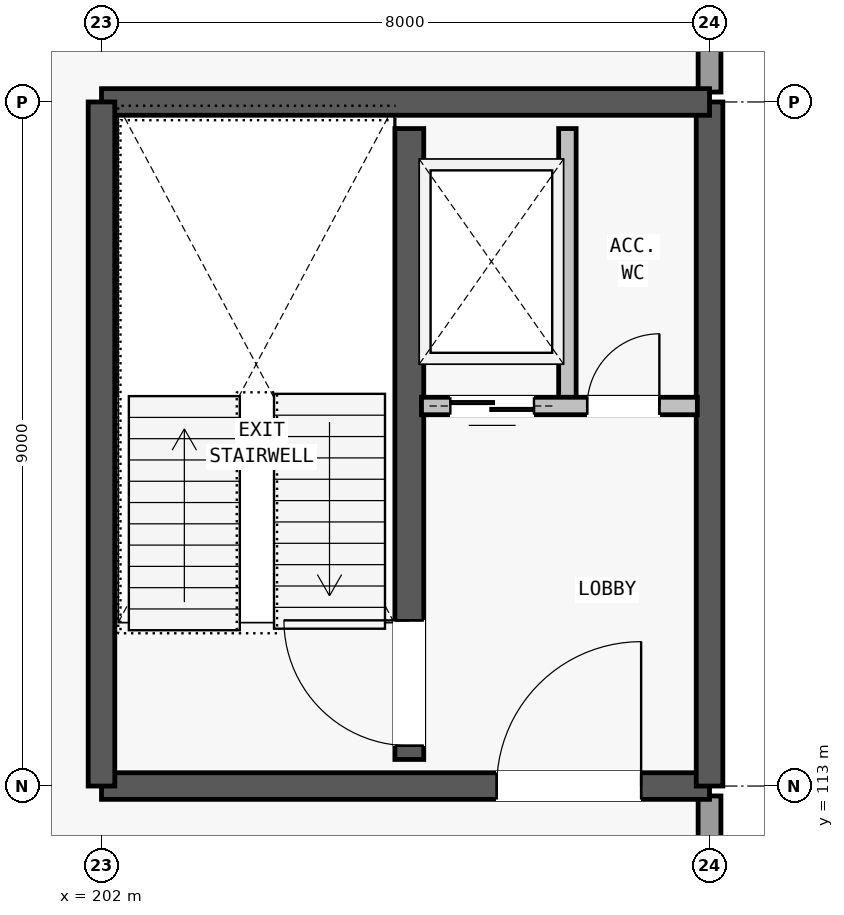
"""IFC4 building model, lengths in metres.
Left out: names, types, materials, properties, quantities, classifications, styles, units other than length and angle.
Written with IfcOpenShell. Run it as: python <this file> out.ifc"""

import sys

from ifc_helpers import new_model, si_unit, direction, frame, frame_2d, origin, place, context, subcontext, project, spatial, rectangle, extrude, element, fill, save


model = new_model("IFC4")
c1 = context("Model", 3, precision=1e-05, world=origin(), true_north=direction((0.0, 1.0)))
c2 = subcontext(c1, "Body", "Model", "MODEL_VIEW")
j1 = project(units=[si_unit("LENGTHUNIT", "METRE"), si_unit("PLANEANGLEUNIT", "RADIAN")], contexts=[c1])
p1 = place(None, origin())
s1 = spatial("IfcSite", under=j1, at=p1, CompositionType="ELEMENT")
p2 = place(p1, origin())
s2 = spatial("IfcBuilding", under=s1, at=p2, CompositionType="ELEMENT")
p3 = place(p2, frame((0.0, 0.0, 17.3)))
s3 = spatial("IfcBuildingStorey", under=s2, at=p3, CompositionType="ELEMENT", Elevation=17.3)
for number, where, z_axis, x_axis in (
    (1, (210.0, 104.235, 0.0), (0.0, 0.0, 1.0), (0.0, 1.0, 0.0)),
    (2, (210.0, 122.13, 0.0), (0.0, 0.0, 1.0), (0.0, 1.0, 0.0)),
):
    element("IfcWall", number, at=place(p3, frame(where, z_axis=z_axis, x_axis=x_axis)), inside=s3, PredefinedType="STANDARD", context=c2, shape_type="SweptSolid", body=[
        extrude(rectangle(XDim=8.635, YDim=0.3, at=frame_2d((4.317, 0.0))), origin(), (0.0, 0.0, 1.0), 2.48),
    ])
p4 = place(p3, frame((202.0, 113.0, 0.0), z_axis=(0.0, 0.0, 1.0), x_axis=(1.0, 0.0, 0.0)))
e3 = element("IfcWall", 3, at=p4, inside=s3, PredefinedType="SHEAR", context=c2, shape_type="SweptSolid", body=[
    extrude(rectangle(XDim=8.0, YDim=0.35, at=frame_2d((4.0, 0.0))), origin(), (0.0, 0.0, 1.0), 3.62),
])
p5 = place(p4, frame((5.2, 0.0, 0.0)))
e4 = element("IfcOpeningElement", 4, at=p5, cuts=e3, PredefinedType="OPENING", context=c2, shape_type="SweptSolid", body=[
    extrude(rectangle(XDim=1.9, YDim=2.3, at=frame_2d((0.95, 1.15))), frame((0.0, 0.185, 0.0), z_axis=(0.0, -1.0, 0.0), x_axis=(1.0, 0.0, 0.0)), (0.0, 0.0, 1.0), 0.37),
])
p6 = place(p3, frame((210.0, 113.0, 0.0), z_axis=(0.0, 0.0, 1.0), x_axis=(0.0, 1.0, 0.0)))
e5 = element("IfcWall", 5, at=p6, inside=s3, PredefinedType="SHEAR", context=c2, shape_type="SweptSolid", body=[
    extrude(rectangle(XDim=9.0, YDim=0.35, at=frame_2d((4.5, 0.0))), origin(), (0.0, 0.0, 1.0), 3.62),
])
p7 = place(p3, frame((210.0, 122.0, 0.0), z_axis=(0.0, 0.0, 1.0), x_axis=(-1.0, 0.0, 0.0)))
e6 = element("IfcWall", 6, at=p7, inside=s3, PredefinedType="SHEAR", context=c2, shape_type="SweptSolid", body=[
    extrude(rectangle(XDim=8.0, YDim=0.35, at=frame_2d((4.0, 0.0))), origin(), (0.0, 0.0, 1.0), 3.62),
])
p8 = place(p3, frame((202.0, 122.0, 0.0), z_axis=(0.0, 0.0, 1.0), x_axis=(0.0, -1.0, 0.0)))
e7 = element("IfcWall", 7, at=p8, inside=s3, PredefinedType="SHEAR", context=c2, shape_type="SweptSolid", body=[
    extrude(rectangle(XDim=9.0, YDim=0.35, at=frame_2d((4.5, 0.0))), origin(), (0.0, 0.0, 1.0), 3.62),
])
p9 = place(p3, frame((206.05, 113.35, 0.0), z_axis=(0.0, 0.0, 1.0), x_axis=(0.0, 1.0, 0.0)))
e8 = element("IfcWall", 8, at=p9, inside=s3, PredefinedType="SHEAR", context=c2, shape_type="SweptSolid", body=[
    extrude(rectangle(XDim=8.3, YDim=0.38, at=frame_2d((4.15, 0.0))), origin(), (0.0, 0.0, 1.0), 3.62),
])
p10 = place(p9, frame((0.18, 0.0, 0.0)))
e9 = element("IfcOpeningElement", 9, at=p10, cuts=e8, PredefinedType="OPENING", context=c2, shape_type="SweptSolid", body=[
    extrude(rectangle(XDim=1.65, YDim=2.2, at=frame_2d((0.825, 1.1))), frame((0.0, 0.2, 0.0), z_axis=(0.0, -1.0, 0.0), x_axis=(1.0, 0.0, 0.0)), (0.0, 0.0, 1.0), 0.4),
])
p11 = place(p3, frame((208.13, 118.0, 0.0), z_axis=(0.0, 0.0, 1.0), x_axis=(0.0, 1.0, 0.0)))
e10 = element("IfcWall", 10, at=p11, inside=s3, PredefinedType="PARTITIONING", context=c2, shape_type="SweptSolid", body=[
    extrude(rectangle(XDim=3.65, YDim=0.23, at=frame_2d((1.825, 0.0))), origin(), (0.0, 0.0, 1.0), 2.48),
])
p12 = place(p3, frame((206.21, 118.0, 0.0), z_axis=(0.0, 0.0, 1.0), x_axis=(1.0, 0.0, 0.0)))
e11 = element("IfcWall", 11, at=p12, inside=s3, PredefinedType="PARTITIONING", context=c2, shape_type="SweptSolid", body=[
    extrude(rectangle(XDim=3.63, YDim=0.23, at=frame_2d((1.815, 0.0))), origin(), (0.0, 0.0, 1.0), 2.48),
])
p13 = place(p12, frame((0.38, 0.0, 0.0)))
e12 = element("IfcOpeningElement", 12, at=p13, cuts=e11, PredefinedType="OPENING", context=c2, shape_type="SweptSolid", body=[
    extrude(rectangle(XDim=1.1, YDim=2.15, at=frame_2d((0.55, 1.075))), frame((0.0, 0.125, 0.0), z_axis=(0.0, -1.0, 0.0), x_axis=(1.0, 0.0, 0.0)), (0.0, 0.0, 1.0), 0.25),
])
p14 = place(p12, frame((2.18, 0.0, 0.0)))
e13 = element("IfcOpeningElement", 13, at=p14, cuts=e11, PredefinedType="OPENING", context=c2, shape_type="SweptSolid", body=[
    extrude(rectangle(XDim=0.95, YDim=2.1, at=frame_2d((0.475, 1.05))), frame((0.0, 0.125, 0.0), z_axis=(0.0, -1.0, 0.0), x_axis=(1.0, 0.0, 0.0)), (0.0, 0.0, 1.0), 0.25),
])
p15 = place(p5, origin())
e14 = element("IfcDoor", 14, at=p15, inside=s3, OperationType="SINGLE_SWING_RIGHT", PredefinedType="DOOR", context=c2, shape_type="SweptSolid", body=[
    extrude(rectangle(XDim=1.9, YDim=2.3, at=frame_2d((0.95, 1.15))), frame((0.0, 0.025, 0.0), z_axis=(0.0, -1.0, 0.0), x_axis=(1.0, 0.0, 0.0)), (0.0, 0.0, 1.0), 0.05),
])
fill(e4, e14)
p16 = place(p10, origin())
e15 = element("IfcDoor", 15, at=p16, inside=s3, OperationType="SINGLE_SWING_RIGHT", PredefinedType="DOOR", context=c2, shape_type="SweptSolid", body=[
    extrude(rectangle(XDim=1.65, YDim=2.2, at=frame_2d((0.825, 1.1))), frame((0.0, 0.025, 0.0), z_axis=(0.0, -1.0, 0.0), x_axis=(1.0, 0.0, 0.0)), (0.0, 0.0, 1.0), 0.05),
])
fill(e9, e15)
p17 = place(p13, origin())
e16 = element("IfcDoor", 16, at=p17, inside=s3, OperationType="SLIDING_TO_LEFT", PredefinedType="DOOR", context=c2, shape_type="SweptSolid", body=[
    extrude(rectangle(XDim=1.1, YDim=2.15, at=frame_2d((0.55, 1.075))), frame((0.0, 0.025, 0.0), z_axis=(0.0, -1.0, 0.0), x_axis=(1.0, 0.0, 0.0)), (0.0, 0.0, 1.0), 0.05),
])
fill(e12, e16)
p18 = place(p14, origin())
e17 = element("IfcDoor", 17, at=p18, inside=s3, OperationType="SINGLE_SWING_RIGHT", PredefinedType="DOOR", context=c2, shape_type="SweptSolid", body=[
    extrude(rectangle(XDim=0.95, YDim=2.1, at=frame_2d((0.475, 1.05))), frame((0.0, 0.025, 0.0), z_axis=(0.0, -1.0, 0.0), x_axis=(1.0, 0.0, 0.0)), (0.0, 0.0, 1.0), 0.05),
])
fill(e13, e17)
save(model, sys.argv[1])
